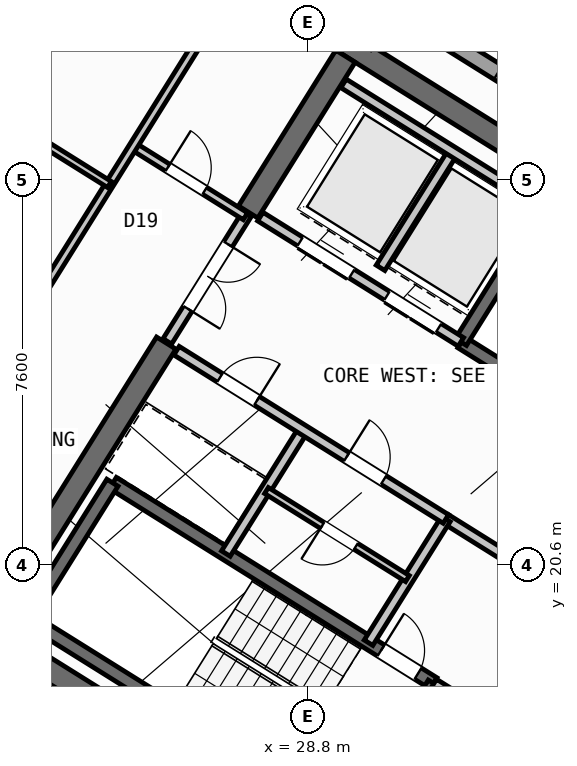
"""IFC4 building model, lengths in metres.
Left out: names, types, materials, properties, quantities, classifications, styles, units other than length and angle.
Written with IfcOpenShell. Run it as: python <this file> out.ifc"""

import sys

from ifc_helpers import new_model, si_unit, direction, frame, frame_2d, origin, place, context, subcontext, project, spatial, rectangle, extrude, source, transform, mapped, element, fill, save


model = new_model("IFC4")
c1 = context("Model", 3, precision=1e-05, world=origin(), true_north=direction((0.0, 1.0)))
c2 = subcontext(c1, "Body", "Model", "MODEL_VIEW")
j1 = project(units=[si_unit("LENGTHUNIT", "METRE"), si_unit("PLANEANGLEUNIT", "RADIAN")], contexts=[c1])
p1 = place(None, origin())
s1 = spatial("IfcSite", under=j1, at=p1, CompositionType="ELEMENT")
p2 = place(p1, origin())
s2 = spatial("IfcBuilding", under=s1, at=p2, CompositionType="ELEMENT")
p3 = place(p2, frame((0.0, 0.0, 273.6)))
s3 = spatial("IfcBuildingStorey", under=s2, at=p3, CompositionType="ELEMENT", Elevation=273.6)
p4 = place(p3, frame((40.531, 24.036, 0.0), z_axis=(0.0, 0.0, 1.0), x_axis=(-0.848048787466, 0.529918157905, 0.0)))
e1 = element("IfcWall", 1, at=p4, inside=s3, PredefinedType="SHEAR", context=c2, shape_type="SweptSolid", body=[
    extrude(rectangle(XDim=13.04, YDim=0.45, at=frame_2d((6.52, 0.0))), origin(), (0.0, 0.0, 1.0), 3.35),
])
p5 = place(p3, frame((33.324, 12.503, 0.0), z_axis=(0.0, 0.0, 1.0), x_axis=(-0.848043529849, 0.529926571782, 0.0)))
e2 = element("IfcWall", 2, at=p5, inside=s3, PredefinedType="SHEAR", context=c2, shape_type="SweptSolid", body=[
    extrude(rectangle(XDim=13.04, YDim=0.45, at=frame_2d((6.52, 0.0))), origin(), (0.0, 0.0, 1.0), 3.35),
])
p6 = place(p3, frame((29.544, 30.636, 0.0), z_axis=(0.0, 0.0, 1.0), x_axis=(-0.529902075036, -0.848058836916, 0.0)))
e3 = element("IfcWall", 3, at=p6, inside=s3, PredefinedType="SHEAR", context=c2, shape_type="SweptSolid", body=[
    extrude(rectangle(XDim=3.625, YDim=0.45, at=frame_2d((1.812, 0.0))), origin(), (0.0, 0.0, 1.0), 3.35),
])
p7 = place(p3, frame((26.007, 24.976, 0.0), z_axis=(0.0, 0.0, 1.0), x_axis=(-0.529931155655, -0.848040665456, 0.0)))
e4 = element("IfcWall", 4, at=p7, inside=s3, PredefinedType="SHEAR", context=c2, shape_type="SweptSolid", body=[
    extrude(rectangle(XDim=6.475, YDim=0.45, at=frame_2d((3.238, 0.0))), origin(), (0.0, 0.0, 1.0), 3.35),
])
p8 = place(p3, frame((29.268, 6.429, 0.0), z_axis=(0.0, 0.0, 1.0), x_axis=(-0.848049971435, 0.529916263149, 0.0)))
e5 = element("IfcWall", 5, at=p8, inside=s3, PredefinedType="STANDARD", context=c2, shape_type="SweptSolid", body=[
    extrude(rectangle(XDim=31.588, YDim=0.32, at=frame_2d((15.794, 0.0))), origin(), (0.0, 0.0, 1.0), 3.35),
])
p9 = place(p8, frame((16.362, 0.0, 0.0)))
e6 = element("IfcOpeningElement", 6, at=p9, cuts=e5, PredefinedType="OPENING", context=c2, shape_type="SweptSolid", body=[
    extrude(rectangle(XDim=1.2, YDim=2.15, at=frame_2d((0.6, 1.075))), frame((0.0, 0.17, 0.0), z_axis=(0.0, -1.0, 0.0), x_axis=(1.0, 0.0, 0.0)), (0.0, 0.0, 1.0), 0.34),
])
p10 = place(p8, frame((3.859, 0.0, 0.9)))
e7 = element("IfcOpeningElement", 7, at=p10, cuts=e5, PredefinedType="OPENING", context=c2, shape_type="SweptSolid", body=[
    extrude(rectangle(XDim=1.65, YDim=1.45, at=frame_2d((0.825, 0.725))), frame((0.0, 0.17, 0.0), z_axis=(0.0, -1.0, 0.0), x_axis=(1.0, 0.0, 0.0)), (0.0, 0.0, 1.0), 0.34),
])
p11 = place(p8, frame((10.519, 0.0, 0.9)))
e8 = element("IfcOpeningElement", 8, at=p11, cuts=e5, PredefinedType="OPENING", context=c2, shape_type="SweptSolid", body=[
    extrude(rectangle(XDim=1.65, YDim=1.45, at=frame_2d((0.825, 0.725))), frame((0.0, 0.17, 0.0), z_axis=(0.0, -1.0, 0.0), x_axis=(1.0, 0.0, 0.0)), (0.0, 0.0, 1.0), 0.34),
])
p12 = place(p8, frame((21.219, 0.0, 0.95)))
e9 = element("IfcOpeningElement", 9, at=p12, cuts=e5, PredefinedType="OPENING", context=c2, shape_type="SweptSolid", body=[
    extrude(rectangle(XDim=1.95, YDim=1.35, at=frame_2d((0.975, 0.675))), frame((0.0, 0.17, 0.0), z_axis=(0.0, -1.0, 0.0), x_axis=(1.0, 0.0, 0.0)), (0.0, 0.0, 1.0), 0.34),
])
p13 = place(p8, frame((26.406, 0.0, 1.0)))
e10 = element("IfcOpeningElement", 10, at=p13, cuts=e5, PredefinedType="OPENING", context=c2, shape_type="SweptSolid", body=[
    extrude(rectangle(XDim=0.9, YDim=1.25, at=frame_2d((0.45, 0.625))), frame((0.0, 0.17, 0.0), z_axis=(0.0, -1.0, 0.0), x_axis=(1.0, 0.0, 0.0)), (0.0, 0.0, 1.0), 0.34),
])
p14 = place(p8, frame((29.143, 0.0, 0.9)))
e11 = element("IfcOpeningElement", 11, at=p14, cuts=e5, PredefinedType="OPENING", context=c2, shape_type="SweptSolid", body=[
    extrude(rectangle(XDim=1.65, YDim=1.45, at=frame_2d((0.825, 0.725))), frame((0.0, 0.17, 0.0), z_axis=(0.0, -1.0, 0.0), x_axis=(1.0, 0.0, 0.0)), (0.0, 0.0, 1.0), 0.34),
])
p15 = place(p3, frame((14.138, 41.825, 0.0), z_axis=(0.0, 0.0, 1.0), x_axis=(0.848046498049, -0.529921821731, 0.0)))
e12 = element("IfcWall", 12, at=p15, inside=s3, PredefinedType="STANDARD", context=c2, shape_type="SweptSolid", body=[
    extrude(rectangle(XDim=31.588, YDim=0.32, at=frame_2d((15.794, 0.0))), origin(), (0.0, 0.0, 1.0), 3.35),
])
p16 = place(p15, frame((3.46, 0.0, 0.0)))
e13 = element("IfcOpeningElement", 13, at=p16, cuts=e12, PredefinedType="OPENING", context=c2, shape_type="SweptSolid", body=[
    extrude(rectangle(XDim=1.05, YDim=2.15, at=frame_2d((0.525, 1.075))), frame((0.0, 0.17, 0.0), z_axis=(0.0, -1.0, 0.0), x_axis=(1.0, 0.0, 0.0)), (0.0, 0.0, 1.0), 0.34),
])
p17 = place(p15, frame((0.831, 0.0, 1.0)))
e14 = element("IfcOpeningElement", 14, at=p17, cuts=e12, PredefinedType="OPENING", context=c2, shape_type="SweptSolid", body=[
    extrude(rectangle(XDim=0.9, YDim=1.25, at=frame_2d((0.45, 0.625))), frame((0.0, 0.17, 0.0), z_axis=(0.0, -1.0, 0.0), x_axis=(1.0, 0.0, 0.0)), (0.0, 0.0, 1.0), 0.34),
])
p18 = place(p15, frame((8.719, 0.0, 0.9)))
e15 = element("IfcOpeningElement", 15, at=p18, cuts=e12, PredefinedType="OPENING", context=c2, shape_type="SweptSolid", body=[
    extrude(rectangle(XDim=1.35, YDim=1.45, at=frame_2d((0.675, 0.725))), frame((0.0, 0.17, 0.0), z_axis=(0.0, -1.0, 0.0), x_axis=(1.0, 0.0, 0.0)), (0.0, 0.0, 1.0), 0.34),
])
p19 = place(p15, frame((13.599, 0.0, 0.95)))
e16 = element("IfcOpeningElement", 16, at=p19, cuts=e12, PredefinedType="OPENING", context=c2, shape_type="SweptSolid", body=[
    extrude(rectangle(XDim=1.95, YDim=1.35, at=frame_2d((0.975, 0.675))), frame((0.0, 0.17, 0.0), z_axis=(0.0, -1.0, 0.0), x_axis=(1.0, 0.0, 0.0)), (0.0, 0.0, 1.0), 0.34),
])
p20 = place(p15, frame((17.154, 0.0, 1.0)))
e17 = element("IfcOpeningElement", 17, at=p20, cuts=e12, PredefinedType="OPENING", context=c2, shape_type="SweptSolid", body=[
    extrude(rectangle(XDim=0.9, YDim=1.25, at=frame_2d((0.45, 0.625))), frame((0.0, 0.17, 0.0), z_axis=(0.0, -1.0, 0.0), x_axis=(1.0, 0.0, 0.0)), (0.0, 0.0, 1.0), 0.34),
])
p21 = place(p15, frame((21.719, 0.0, 0.9)))
e18 = element("IfcOpeningElement", 18, at=p21, cuts=e12, PredefinedType="OPENING", context=c2, shape_type="SweptSolid", body=[
    extrude(rectangle(XDim=1.65, YDim=1.45, at=frame_2d((0.825, 0.725))), frame((0.0, 0.17, 0.0), z_axis=(0.0, -1.0, 0.0), x_axis=(1.0, 0.0, 0.0)), (0.0, 0.0, 1.0), 0.34),
])
p22 = place(p15, frame((27.419, 0.0, 0.9)))
e19 = element("IfcOpeningElement", 19, at=p22, cuts=e12, PredefinedType="OPENING", context=c2, shape_type="SweptSolid", body=[
    extrude(rectangle(XDim=1.65, YDim=1.45, at=frame_2d((0.825, 0.725))), frame((0.0, 0.17, 0.0), z_axis=(0.0, -1.0, 0.0), x_axis=(1.0, 0.0, 0.0)), (0.0, 0.0, 1.0), 0.34),
])
p23 = place(p3, frame((29.605, 15.581, 0.0), z_axis=(0.0, 0.0, 1.0), x_axis=(-0.848036911448, 0.529937163087, 0.0)))
e20 = element("IfcWall", 20, at=p23, inside=s3, PredefinedType="SHEAR", context=c2, shape_type="SweptSolid", body=[
    extrude(rectangle(XDim=7.46, YDim=0.26, at=frame_2d((3.73, 0.0))), origin(), (0.0, 0.0, 1.0), 3.35),
])
p24 = place(p3, frame((31.28, 18.261, 0.0), z_axis=(0.0, 0.0, 1.0), x_axis=(-0.848051618787, 0.529913626805, 0.0)))
e21 = element("IfcWall", 21, at=p24, inside=s3, PredefinedType="SHEAR", context=c2, shape_type="SweptSolid", body=[
    extrude(rectangle(XDim=7.46, YDim=0.26, at=frame_2d((3.73, 0.0))), origin(), (0.0, 0.0, 1.0), 3.35),
])
p25 = place(p24, frame((0.36, 0.0, 0.0)))
e22 = element("IfcOpeningElement", 22, at=p25, cuts=e21, PredefinedType="OPENING", context=c2, shape_type="SweptSolid", body=[
    extrude(rectangle(XDim=0.86, YDim=2.05, at=frame_2d((0.43, 1.025))), frame((0.0, 0.14, 0.0), z_axis=(0.0, -1.0, 0.0), x_axis=(1.0, 0.0, 0.0)), (0.0, 0.0, 1.0), 0.28),
])
p26 = place(p3, frame((31.288, 18.256, 0.0), z_axis=(0.0, 0.0, 1.0), x_axis=(-0.529943379326, -0.848033026897, 0.0)))
e23 = element("IfcWall", 23, at=p26, inside=s3, PredefinedType="SHEAR", context=c2, shape_type="SweptSolid", body=[
    extrude(rectangle(XDim=3.16, YDim=0.26, at=frame_2d((1.58, 0.0))), origin(), (0.0, 0.0, 1.0), 3.35),
])
p27 = place(p3, frame((24.945, 22.22, 0.0), z_axis=(0.0, 0.0, 1.0), x_axis=(-0.529908658664, -0.84805472316, 0.0)))
e24 = element("IfcWall", 24, at=p27, inside=s3, PredefinedType="SHEAR", context=c2, shape_type="SweptSolid", body=[
    extrude(rectangle(XDim=3.16, YDim=0.26, at=frame_2d((1.58, 0.0))), origin(), (0.0, 0.0, 1.0), 3.35),
])
p28 = place(p3, frame((38.046, 21.108, 0.0), z_axis=(0.0, 0.0, 1.0), x_axis=(-0.848054434086, 0.529909121291, 0.0)))
e25 = element("IfcWall", 25, at=p28, inside=s3, PredefinedType="SHEAR", context=c2, shape_type="SweptSolid", body=[
    extrude(rectangle(XDim=7.33, YDim=0.26, at=frame_2d((3.665, 0.0))), origin(), (0.0, 0.0, 1.0), 3.35),
])
p29 = place(p28, frame((0.22, 0.0, 0.0)))
e26 = element("IfcOpeningElement", 26, at=p29, cuts=e25, PredefinedType="OPENING", context=c2, shape_type="SweptSolid", body=[
    extrude(rectangle(XDim=1.1, YDim=2.1, at=frame_2d((0.55, 1.05))), frame((0.0, 0.14, 0.0), z_axis=(0.0, -1.0, 0.0), x_axis=(1.0, 0.0, 0.0)), (0.0, 0.0, 1.0), 0.28),
])
p30 = place(p3, frame((33.496, 27.677, 0.0), z_axis=(0.0, 0.0, 1.0), x_axis=(-0.529908658664, -0.84805472316, 0.0)))
e27 = element("IfcWall", 27, at=p30, inside=s3, PredefinedType="SHEAR", context=c2, shape_type="SweptSolid", body=[
    extrude(rectangle(XDim=3.16, YDim=0.26, at=frame_2d((1.58, 0.0))), origin(), (0.0, 0.0, 1.0), 3.35),
])
p31 = place(p3, frame((34.933, 15.978, 0.0), z_axis=(0.0, 0.0, 1.0), x_axis=(-0.848055739377, 0.529907032327, 0.0)))
e28 = element("IfcWall", 28, at=p31, inside=s3, PredefinedType="STANDARD", context=c2, shape_type="SweptSolid", body=[
    extrude(rectangle(XDim=4.298, YDim=0.2, at=frame_2d((2.149, 0.0))), origin(), (0.0, 0.0, 1.0), 3.34),
])
p32 = place(p31, frame((0.448, 0.0, 0.0)))
e29 = element("IfcOpeningElement", 29, at=p32, cuts=e28, PredefinedType="OPENING", context=c2, shape_type="SweptSolid", body=[
    extrude(rectangle(XDim=1.3, YDim=2.2, at=frame_2d((0.65, 1.1))), frame((0.0, 0.11, 0.0), z_axis=(0.0, -1.0, 0.0), x_axis=(1.0, 0.0, 0.0)), (0.0, 0.0, 1.0), 0.22),
])
p33 = place(p31, frame((2.523, 0.0, 0.0)))
e30 = element("IfcOpeningElement", 30, at=p33, cuts=e28, PredefinedType="OPENING", context=c2, shape_type="SweptSolid", body=[
    extrude(rectangle(XDim=1.45, YDim=2.25, at=frame_2d((0.725, 1.125))), frame((0.0, 0.11, 0.0), z_axis=(0.0, -1.0, 0.0), x_axis=(1.0, 0.0, 0.0)), (0.0, 0.0, 1.0), 0.22),
])
p34 = place(p3, frame((36.459, 18.421, 0.0), z_axis=(0.0, 0.0, 1.0), x_axis=(-0.848059591691, 0.529900867089, 0.0)))
e31 = element("IfcWall", 31, at=p34, inside=s3, PredefinedType="STANDARD", context=c2, shape_type="SweptSolid", body=[
    extrude(rectangle(XDim=5.818, YDim=0.2, at=frame_2d((2.909, 0.0))), origin(), (0.0, 0.0, 1.0), 3.34),
])
p35 = place(p34, frame((2.598, 0.0, 0.0)))
e32 = element("IfcOpeningElement", 32, at=p35, cuts=e31, PredefinedType="OPENING", context=c2, shape_type="SweptSolid", body=[
    extrude(rectangle(XDim=1.15, YDim=2.1, at=frame_2d((0.575, 1.05))), frame((0.0, 0.11, 0.0), z_axis=(0.0, -1.0, 0.0), x_axis=(1.0, 0.0, 0.0)), (0.0, 0.0, 1.0), 0.22),
])
p36 = place(p3, frame((31.822, 24.998, 0.0), z_axis=(0.0, 0.0, 1.0), x_axis=(-0.848054125777, 0.529909614701, 0.0)))
e33 = element("IfcWall", 33, at=p36, inside=s3, PredefinedType="STANDARD", context=c2, shape_type="SweptSolid", body=[
    extrude(rectangle(XDim=4.668, YDim=0.2, at=frame_2d((2.334, 0.0))), origin(), (0.0, 0.0, 1.0), 3.34),
])
p37 = place(p36, frame((0.52, 0.0, 0.0)))
e34 = element("IfcOpeningElement", 34, at=p37, cuts=e33, PredefinedType="OPENING", context=c2, shape_type="SweptSolid", body=[
    extrude(rectangle(XDim=1.2, YDim=2.15, at=frame_2d((0.6, 1.075))), frame((0.0, 0.11, 0.0), z_axis=(0.0, -1.0, 0.0), x_axis=(1.0, 0.0, 0.0)), (0.0, 0.0, 1.0), 0.22),
])
p38 = place(p36, frame((2.54, 0.0, 0.0)))
e35 = element("IfcOpeningElement", 35, at=p38, cuts=e33, PredefinedType="OPENING", context=c2, shape_type="SweptSolid", body=[
    extrude(rectangle(XDim=1.2, YDim=2.15, at=frame_2d((0.6, 1.075))), frame((0.0, 0.11, 0.0), z_axis=(0.0, -1.0, 0.0), x_axis=(1.0, 0.0, 0.0)), (0.0, 0.0, 1.0), 0.22),
])
p39 = place(p3, frame((31.645, 28.716, 0.0), z_axis=(0.0, 0.0, 1.0), x_axis=(-0.52986693015, -0.848080795876, 0.0)))
e36 = element("IfcWall", 36, at=p39, inside=s3, PredefinedType="STANDARD", context=c2, shape_type="SweptSolid", body=[
    extrude(rectangle(XDim=2.66, YDim=0.2, at=frame_2d((1.33, 0.0))), origin(), (0.0, 0.0, 1.0), 3.34),
])
p40 = place(p3, frame((33.363, 27.69, 0.0), z_axis=(0.0, 0.0, 1.0), x_axis=(-0.84804957148, 0.529916903215, 0.0)))
e37 = element("IfcWall", 37, at=p40, inside=s3, PredefinedType="STANDARD", context=c2, shape_type="SweptSolid", body=[
    extrude(rectangle(XDim=4.548, YDim=0.2, at=frame_2d((2.274, 0.0))), origin(), (0.0, 0.0, 1.0), 3.34),
])
for number, where, z_axis, x_axis in (
    (38, (31.525, 21.504, 0.0), (0.0, 0.0, 1.0), (-0.53, -0.848, 0.0)),
    (39, (28.71, 23.263, 0.0), (0.0, 0.0, 1.0), (-0.53, -0.848, 0.0)),
):
    element("IfcWall", number, at=place(p3, frame(where, z_axis=z_axis, x_axis=x_axis)), inside=s3, PredefinedType="STANDARD", context=c2, shape_type="SweptSolid", body=[
        extrude(rectangle(XDim=2.88, YDim=0.2, at=frame_2d((1.44, 0.0))), origin(), (0.0, 0.0, 1.0), 3.34),
    ])
p41 = place(p3, frame((31.525, 21.504, 0.0), z_axis=(0.0, 0.0, 1.0), x_axis=(-0.848042066329, 0.529928913853, 0.0)))
e40 = element("IfcWall", 40, at=p41, inside=s3, PredefinedType="STANDARD", context=c2, shape_type="SweptSolid", body=[
    extrude(rectangle(XDim=6.268, YDim=0.2, at=frame_2d((3.134, 0.0))), origin(), (0.0, 0.0, 1.0), 3.34),
])
p42 = place(p41, frame((4.4, 0.0, 0.0)))
e41 = element("IfcOpeningElement", 41, at=p42, cuts=e40, PredefinedType="OPENING", context=c2, shape_type="SweptSolid", body=[
    extrude(rectangle(XDim=0.86, YDim=2.05, at=frame_2d((0.43, 1.025))), frame((0.0, 0.11, 0.0), z_axis=(0.0, -1.0, 0.0), x_axis=(1.0, 0.0, 0.0)), (0.0, 0.0, 1.0), 0.22),
])
p43 = place(p41, frame((1.45, 0.0, 0.0)))
e42 = element("IfcOpeningElement", 42, at=p43, cuts=e40, PredefinedType="OPENING", context=c2, shape_type="SweptSolid", body=[
    extrude(rectangle(XDim=0.86, YDim=2.05, at=frame_2d((0.43, 1.025))), frame((0.0, 0.11, 0.0), z_axis=(0.0, -1.0, 0.0), x_axis=(1.0, 0.0, 0.0)), (0.0, 0.0, 1.0), 0.22),
])
p44 = place(p3, frame((30.766, 20.327, 0.0), z_axis=(0.0, 0.0, 1.0), x_axis=(-0.848052663127, 0.529911955482, 0.0)))
e43 = element("IfcWall", 43, at=p44, inside=s3, PredefinedType="PLUMBINGWALL", context=c2, shape_type="SweptSolid", body=[
    extrude(rectangle(XDim=3.28, YDim=0.14, at=frame_2d((1.64, 0.0))), origin(), (0.0, 0.0, 1.0), 3.34),
])
p45 = place(p44, frame((1.2, 0.0, 0.0)))
e44 = element("IfcOpeningElement", 44, at=p45, cuts=e43, PredefinedType="OPENING", context=c2, shape_type="SweptSolid", body=[
    extrude(rectangle(XDim=0.78, YDim=2.05, at=frame_2d((0.39, 1.025))), frame((0.0, 0.08, 0.0), z_axis=(0.0, -1.0, 0.0), x_axis=(1.0, 0.0, 0.0)), (0.0, 0.0, 1.0), 0.16),
])
p46 = place(p3, frame((27.596, 27.52, 0.0), z_axis=(0.0, 0.0, 1.0), x_axis=(-0.529865479138, -0.848081702443, 0.0)))
e45 = element("IfcWall", 45, at=p46, inside=s3, PredefinedType="STANDARD", context=c2, shape_type="SweptSolid", body=[
    extrude(rectangle(XDim=2.96, YDim=0.2, at=frame_2d((1.48, 0.0))), origin(), (0.0, 0.0, 1.0), 3.34),
])
p47 = place(p46, frame((0.7, 0.0, 0.0)))
e46 = element("IfcOpeningElement", 46, at=p47, cuts=e45, PredefinedType="OPENING", context=c2, shape_type="SweptSolid", body=[
    extrude(rectangle(XDim=1.5, YDim=2.15, at=frame_2d((0.75, 1.075))), frame((0.0, 0.11, 0.0), z_axis=(0.0, -1.0, 0.0), x_axis=(1.0, 0.0, 0.0)), (0.0, 0.0, 1.0), 0.22),
])
p48 = place(p3, frame((27.57, 27.478, 0.0), z_axis=(0.0, 0.0, 1.0), x_axis=(-0.848050851465, 0.529914854792, 0.0)))
e47 = element("IfcWall", 47, at=p48, inside=s3, PredefinedType="PARTITIONING", context=c2, shape_type="SweptSolid", body=[
    extrude(rectangle(XDim=2.61, YDim=0.16, at=frame_2d((1.305, 0.0))), origin(), (0.0, 0.0, 1.0), 3.34),
])
p49 = place(p48, frame((0.95, 0.0, 0.0)))
e48 = element("IfcOpeningElement", 48, at=p49, cuts=e47, PredefinedType="OPENING", context=c2, shape_type="SweptSolid", body=[
    extrude(rectangle(XDim=0.86, YDim=2.05, at=frame_2d((0.43, 1.025))), frame((0.0, 0.09, 0.0), z_axis=(0.0, -1.0, 0.0), x_axis=(1.0, 0.0, 0.0)), (0.0, 0.0, 1.0), 0.18),
])
p50 = place(p3, frame((27.953, 33.016, 0.0), z_axis=(0.0, 0.0, 1.0), x_axis=(-0.529909450694, -0.848054228257, 0.0)))
e49 = element("IfcWall", 49, at=p50, inside=s3, PredefinedType="PARTITIONING", context=c2, shape_type="SweptSolid", body=[
    extrude(rectangle(XDim=10.3, YDim=0.16, at=frame_2d((5.15, 0.0))), origin(), (0.0, 0.0, 1.0), 3.34),
])
p51 = place(p3, frame((24.309, 34.336, 0.0), z_axis=(0.0, 0.0, 1.0), x_axis=(-0.529895484599, -0.848062954858, 0.0)))
e50 = element("IfcWall", 50, at=p51, inside=s3, PredefinedType="PARTITIONING", context=c2, shape_type="SweptSolid", body=[
    extrude(rectangle(XDim=6.576, YDim=0.16, at=frame_2d((3.288, 0.0))), origin(), (0.0, 0.0, 1.0), 2.875),
])
p52 = place(p3, frame((24.885, 28.106, 0.0), z_axis=(0.0, 0.0, 1.0), x_axis=(-0.848059820872, 0.529900500304, 0.0)))
e51 = element("IfcWall", 51, at=p52, inside=s3, PredefinedType="PLUMBINGWALL", context=c2, shape_type="SweptSolid", body=[
    extrude(rectangle(XDim=3.79, YDim=0.14, at=frame_2d((1.895, 0.0))), origin(), (0.0, 0.0, 1.0), 3.34),
])
p53 = place(p52, frame((2.23, 0.0, 0.0)))
e52 = element("IfcOpeningElement", 52, at=p53, cuts=e51, PredefinedType="OPENING", context=c2, shape_type="SweptSolid", body=[
    extrude(rectangle(XDim=0.92, YDim=2.08, at=frame_2d((0.46, 1.04))), frame((0.0, 0.08, 0.0), z_axis=(0.0, -1.0, 0.0), x_axis=(1.0, 0.0, 0.0)), (0.0, 0.0, 1.0), 0.16),
])
p54 = place(p3, frame((32.164, 10.374, 0.0), z_axis=(0.0, 0.0, 1.0), x_axis=(-0.848044107957, 0.529925646633, 0.0)))
e53 = element("IfcWall", 53, at=p54, inside=s3, PredefinedType="PARTITIONING", context=c2, shape_type="SweptSolid", body=[
    extrude(rectangle(XDim=15.57, YDim=0.16, at=frame_2d((7.785, 0.0))), origin(), (0.0, 0.0, 1.0), 3.34),
])
p55 = place(p54, frame((10.83, 0.0, 0.0)))
e54 = element("IfcOpeningElement", 54, at=p55, cuts=e53, PredefinedType="OPENING", context=c2, shape_type="SweptSolid", body=[
    extrude(rectangle(XDim=1.0, YDim=2.1, at=frame_2d((0.5, 1.05))), frame((0.0, 0.09, 0.0), z_axis=(0.0, -1.0, 0.0), x_axis=(1.0, 0.0, 0.0)), (0.0, 0.0, 1.0), 0.18),
])
m1 = source(origin(), c2, "Body", "SweptSolid", [
    extrude(rectangle(XDim=0.86, YDim=2.05, at=frame_2d((0.43, 1.025))), frame((0.0, 0.025, 0.0), z_axis=(0.0, -1.0, 0.0), x_axis=(1.0, 0.0, 0.0)), (0.0, 0.0, 1.0), 0.05),
])
p56 = place(p25, frame((0.86, 0.0, 0.0), z_axis=(0.0, 0.0, 1.0), x_axis=(-1.0, 0.0, 0.0)))
e55 = element("IfcDoor", 55, at=p56, inside=s3, OperationType="SINGLE_SWING_LEFT", PredefinedType="DOOR", context=c2, shape_type="MappedRepresentation", body=[
    mapped(m1, transform((0.0, 0.0, 0.0), scale=1.0)),
])
fill(e22, e55)
m2 = source(origin(), c2, "Body", "SweptSolid", [
    extrude(rectangle(XDim=1.2, YDim=2.15, at=frame_2d((0.6, 1.075))), frame((0.0, 0.025, 0.0), z_axis=(0.0, -1.0, 0.0), x_axis=(1.0, 0.0, 0.0)), (0.0, 0.0, 1.0), 0.05),
])
p57 = place(p37, origin())
e56 = element("IfcDoor", 56, at=p57, inside=s3, OperationType="DOUBLE_DOOR_SLIDING", PredefinedType="DOOR", context=c2, shape_type="MappedRepresentation", body=[
    mapped(m2, transform((0.0, 0.0, 0.0), scale=1.0)),
])
fill(e34, e56)
p58 = place(p38, origin())
e57 = element("IfcDoor", 57, at=p58, inside=s3, OperationType="DOUBLE_DOOR_SLIDING", PredefinedType="DOOR", context=c2, shape_type="MappedRepresentation", body=[
    mapped(m2, transform((0.0, 0.0, 0.0), scale=1.0)),
])
fill(e35, e57)
p59 = place(p42, frame((0.86, 0.0, 0.0), z_axis=(0.0, 0.0, 1.0), x_axis=(-1.0, 0.0, 0.0)))
e58 = element("IfcDoor", 58, at=p59, inside=s3, OperationType="SINGLE_SWING_RIGHT", PredefinedType="DOOR", context=c2, shape_type="MappedRepresentation", body=[
    mapped(m1, transform((0.0, 0.0, 0.0), scale=1.0)),
])
fill(e41, e58)
p60 = place(p43, frame((0.86, 0.0, 0.0), z_axis=(0.0, 0.0, 1.0), x_axis=(-1.0, 0.0, 0.0)))
e59 = element("IfcDoor", 59, at=p60, inside=s3, OperationType="SINGLE_SWING_LEFT", PredefinedType="DOOR", context=c2, shape_type="MappedRepresentation", body=[
    mapped(m1, transform((0.0, 0.0, 0.0), scale=1.0)),
])
fill(e42, e59)
m3 = source(origin(), c2, "Body", "SweptSolid", [
    extrude(rectangle(XDim=0.78, YDim=2.05, at=frame_2d((0.39, 1.025))), frame((0.0, 0.025, 0.0), z_axis=(0.0, -1.0, 0.0), x_axis=(1.0, 0.0, 0.0)), (0.0, 0.0, 1.0), 0.05),
])
p61 = place(p45, origin())
e60 = element("IfcDoor", 60, at=p61, inside=s3, OperationType="SINGLE_SWING_RIGHT", PredefinedType="DOOR", context=c2, shape_type="MappedRepresentation", body=[
    mapped(m3, transform((0.0, 0.0, 0.0), scale=1.0)),
])
fill(e44, e60)
p62 = place(p49, frame((0.86, 0.0, 0.0), z_axis=(0.0, 0.0, 1.0), x_axis=(-1.0, 0.0, 0.0)))
e61 = element("IfcDoor", 61, at=p62, inside=s3, OperationType="SINGLE_SWING_LEFT", PredefinedType="DOOR", context=c2, shape_type="MappedRepresentation", body=[
    mapped(m1, transform((0.0, 0.0, 0.0), scale=1.0)),
])
fill(e48, e61)
m4 = source(origin(), c2, "Body", "SweptSolid", [
    extrude(rectangle(XDim=1.5, YDim=2.15, at=frame_2d((0.75, 1.075))), frame((0.0, 0.025, 0.0), z_axis=(0.0, -1.0, 0.0), x_axis=(1.0, 0.0, 0.0)), (0.0, 0.0, 1.0), 0.05),
])
p63 = place(p47, origin())
e62 = element("IfcDoor", 62, at=p63, inside=s3, OperationType="DOUBLE_DOOR_SINGLE_SWING", PredefinedType="DOOR", context=c2, shape_type="MappedRepresentation", body=[
    mapped(m4, transform((0.0, 0.0, 0.0), scale=1.0)),
])
fill(e46, e62)
save(model, sys.argv[1])
